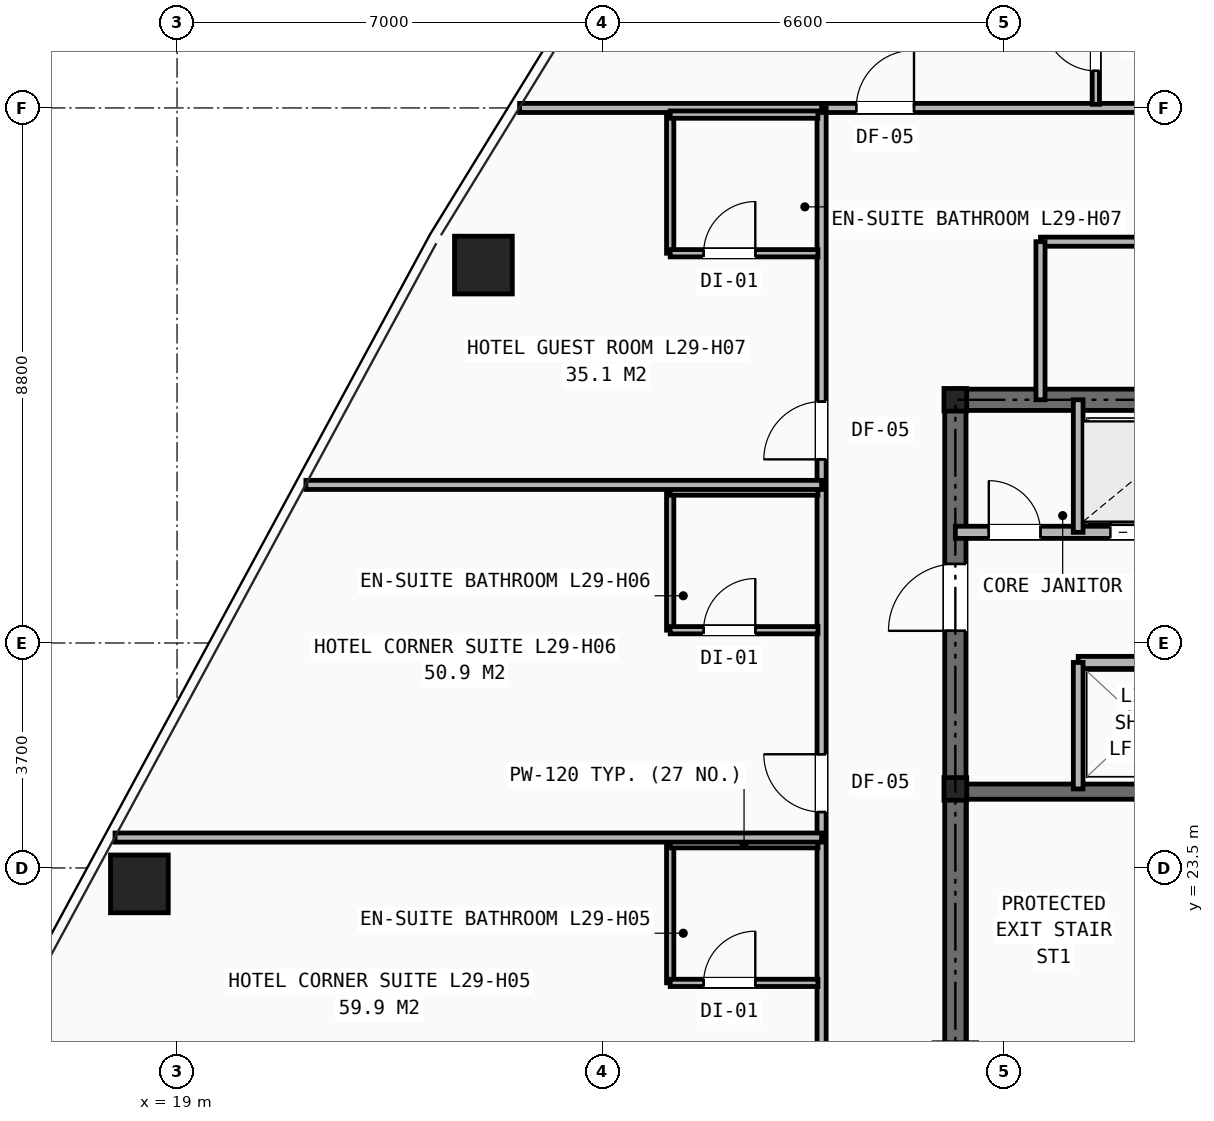
"""IFC4 building model, lengths in metres.
Left out: names, types, materials, properties, quantities, classifications, styles, units other than length and angle.
Written with IfcOpenShell. Run it as: python <this file> out.ifc"""

import sys

from ifc_helpers import new_model, si_unit, direction, frame, frame_2d, origin, origin_2d, place, context, subcontext, project, spatial, rectangle, hollow_rectangle, i_section, extrude, element, fill, save


model = new_model("IFC4")
c1 = context("Model", 3, precision=1e-05, world=origin(), true_north=direction((0.0, 1.0)))
c2 = subcontext(c1, "Body", "Model", "MODEL_VIEW")
j1 = project(units=[si_unit("LENGTHUNIT", "METRE"), si_unit("PLANEANGLEUNIT", "RADIAN")], contexts=[c1])
p1 = place(None, origin())
s1 = spatial("IfcSite", under=j1, at=p1, CompositionType="ELEMENT")
p2 = place(p1, origin())
s2 = spatial("IfcBuilding", under=s1, at=p2, CompositionType="ELEMENT")
p3 = place(p2, frame((0.0, 0.0, 102.2)))
s3 = spatial("IfcBuildingStorey", under=s2, at=p3, CompositionType="ELEMENT", Elevation=102.2)
for number, where, z_axis, x_axis in (
    (1, (31.8, 24.8, 0.0), (0.0, 0.0, 1.0), (1.0, 0.0, 0.0)),
    (2, (31.8, 31.2, 0.0), (0.0, 0.0, 1.0), (1.0, 0.0, 0.0)),
):
    element("IfcColumn", number, at=place(p3, frame(where, z_axis=z_axis, x_axis=x_axis)), inside=s3, PredefinedType="COLUMN", context=c2, shape_type="SweptSolid", body=[
        extrude(i_section(OverallWidth=0.374, OverallDepth=0.372, WebThickness=0.016, FlangeThickness=0.026, at=origin_2d()), origin(), (0.0, 0.0, 1.0), 3.2),
    ])
for number, where, z_axis, x_axis in (
    (3, (24.038, 33.416, 0.0), (0.0, 0.0, 1.0), (1.0, 0.0, 0.0)),
    (4, (18.381, 23.238, 0.0), (0.0, 0.0, 1.0), (1.0, 0.0, 0.0)),
):
    element("IfcColumn", number, at=place(p3, frame(where, z_axis=z_axis, x_axis=x_axis)), inside=s3, PredefinedType="COLUMN", context=c2, shape_type="SweptSolid", body=[
        extrude(hollow_rectangle(XDim=0.95, YDim=0.95, WallThickness=0.065, at=origin_2d()), origin(), (0.0, 0.0, 1.0), 3.2),
    ])
p4 = place(p3, frame((31.8, 31.2, 0.0), z_axis=(0.0, 0.0, 1.0), x_axis=(1.0, 0.0, 0.0)))
e5 = element("IfcWall", 5, at=p4, inside=s3, PredefinedType="SHEAR", context=c2, shape_type="SweptSolid", body=[
    extrude(rectangle(XDim=16.4, YDim=0.35, at=frame_2d((8.2, 0.0))), origin(), (0.0, 0.0, 1.0), 2.97),
])
p5 = place(p3, frame((31.8, 16.4, 0.0), z_axis=(0.0, 0.0, 1.0), x_axis=(0.0, 1.0, 0.0)))
e6 = element("IfcWall", 6, at=p5, inside=s3, PredefinedType="SHEAR", context=c2, shape_type="SweptSolid", body=[
    extrude(rectangle(XDim=14.8, YDim=0.35, at=frame_2d((7.4, 0.0))), origin(), (0.0, 0.0, 1.0), 2.97),
])
p6 = place(p5, frame((11.0, 0.0, 0.0)))
e7 = element("IfcOpeningElement", 7, at=p6, cuts=e6, PredefinedType="OPENING", context=c2, shape_type="SweptSolid", body=[
    extrude(rectangle(XDim=1.1, YDim=2.15, at=frame_2d((0.55, 1.075))), frame((0.0, 0.185, 0.0), z_axis=(0.0, -1.0, 0.0), x_axis=(1.0, 0.0, 0.0)), (0.0, 0.0, 1.0), 0.37),
])
p7 = place(p3, frame((31.8, 24.755, 0.0), z_axis=(0.0, 0.0, 1.0), x_axis=(1.0, 0.0, 0.0)))
e8 = element("IfcWall", 8, at=p7, inside=s3, PredefinedType="SHEAR", context=c2, shape_type="SweptSolid", body=[
    extrude(rectangle(XDim=3.245, YDim=0.25, at=frame_2d((1.623, 0.0))), origin(), (0.0, 0.0, 1.0), 2.97),
])
p8 = place(p3, frame((31.8, 29.02, 0.0), z_axis=(0.0, 0.0, 1.0), x_axis=(1.0, 0.0, 0.0)))
e9 = element("IfcWall", 9, at=p8, inside=s3, PredefinedType="SOLIDWALL", context=c2, shape_type="SweptSolid", body=[
    extrude(rectangle(XDim=16.4, YDim=0.2, at=frame_2d((8.2, 0.0))), origin(), (0.0, 0.0, 1.0), 2.421),
])
p9 = place(p8, frame((0.55, 0.0, 0.0)))
e10 = element("IfcOpeningElement", 10, at=p9, cuts=e9, PredefinedType="OPENING", context=c2, shape_type="SweptSolid", body=[
    extrude(rectangle(XDim=0.85, YDim=2.05, at=frame_2d((0.425, 1.025))), frame((0.0, 0.11, 0.0), z_axis=(0.0, -1.0, 0.0), x_axis=(1.0, 0.0, 0.0)), (0.0, 0.0, 1.0), 0.22),
])
p10 = place(p8, frame((2.55, 0.0, 0.0)))
e11 = element("IfcOpeningElement", 11, at=p10, cuts=e9, PredefinedType="OPENING", context=c2, shape_type="SweptSolid", body=[
    extrude(rectangle(XDim=1.1, YDim=2.15, at=frame_2d((0.55, 1.075))), frame((0.0, 0.11, 0.0), z_axis=(0.0, -1.0, 0.0), x_axis=(1.0, 0.0, 0.0)), (0.0, 0.0, 1.0), 0.22),
])
p11 = place(p8, frame((4.71, 0.0, 0.0)))
e12 = element("IfcOpeningElement", 12, at=p11, cuts=e9, PredefinedType="OPENING", context=c2, shape_type="SweptSolid", body=[
    extrude(rectangle(XDim=1.1, YDim=2.15, at=frame_2d((0.55, 1.075))), frame((0.0, 0.11, 0.0), z_axis=(0.0, -1.0, 0.0), x_axis=(1.0, 0.0, 0.0)), (0.0, 0.0, 1.0), 0.22),
])
p12 = place(p8, frame((6.87, 0.0, 0.0)))
e13 = element("IfcOpeningElement", 13, at=p12, cuts=e9, PredefinedType="OPENING", context=c2, shape_type="SweptSolid", body=[
    extrude(rectangle(XDim=1.1, YDim=2.15, at=frame_2d((0.55, 1.075))), frame((0.0, 0.11, 0.0), z_axis=(0.0, -1.0, 0.0), x_axis=(1.0, 0.0, 0.0)), (0.0, 0.0, 1.0), 0.22),
])
p13 = place(p8, frame((9.03, 0.0, 0.0)))
e14 = element("IfcOpeningElement", 14, at=p13, cuts=e9, PredefinedType="OPENING", context=c2, shape_type="SweptSolid", body=[
    extrude(rectangle(XDim=1.1, YDim=2.15, at=frame_2d((0.55, 1.075))), frame((0.0, 0.11, 0.0), z_axis=(0.0, -1.0, 0.0), x_axis=(1.0, 0.0, 0.0)), (0.0, 0.0, 1.0), 0.22),
])
p14 = place(p3, frame((33.82, 26.88, 0.0), z_axis=(0.0, 0.0, 1.0), x_axis=(1.0, 0.0, 0.0)))
e15 = element("IfcWall", 15, at=p14, inside=s3, PredefinedType="SOLIDWALL", context=c2, shape_type="SweptSolid", body=[
    extrude(rectangle(XDim=14.38, YDim=0.2, at=frame_2d((7.19, 0.0))), origin(), (0.0, 0.0, 1.0), 2.421),
])
p15 = place(p3, frame((33.82, 29.02, 0.0), z_axis=(0.0, 0.0, 1.0), x_axis=(0.0, 1.0, 0.0)))
e16 = element("IfcWall", 16, at=p15, inside=s3, PredefinedType="SOLIDWALL", context=c2, shape_type="SweptSolid", body=[
    extrude(rectangle(XDim=2.18, YDim=0.16, at=frame_2d((1.09, 0.0))), origin(), (0.0, 0.0, 1.0), 2.421),
])
p16 = place(p3, frame((33.82, 24.8, 0.0), z_axis=(0.0, 0.0, 1.0), x_axis=(0.0, 1.0, 0.0)))
e17 = element("IfcWall", 17, at=p16, inside=s3, PredefinedType="SOLIDWALL", context=c2, shape_type="SweptSolid", body=[
    extrude(rectangle(XDim=2.08, YDim=0.16, at=frame_2d((1.04, 0.0))), origin(), (0.0, 0.0, 1.0), 2.97),
])
p17 = place(p3, frame((33.2, 33.8, 0.0), z_axis=(0.0, 0.0, 1.0), x_axis=(1.0, 0.0, 0.0)))
e18 = element("IfcWall", 18, at=p17, inside=s3, PredefinedType="PARTITIONING", context=c2, shape_type="SweptSolid", body=[
    extrude(rectangle(XDim=13.0, YDim=0.15, at=frame_2d((6.5, 0.0))), origin(), (0.0, 0.0, 1.0), 2.97),
])
p18 = place(p17, frame((1.7, 0.0, 0.0)))
e19 = element("IfcOpeningElement", 19, at=p18, cuts=e18, PredefinedType="OPENING", context=c2, shape_type="SweptSolid", body=[
    extrude(rectangle(XDim=0.9, YDim=2.1, at=frame_2d((0.45, 1.05))), frame((0.0, 0.085, 0.0), z_axis=(0.0, -1.0, 0.0), x_axis=(1.0, 0.0, 0.0)), (0.0, 0.0, 1.0), 0.17),
])
p19 = place(p17, frame((6.0, 0.0, 0.0)))
e20 = element("IfcOpeningElement", 20, at=p19, cuts=e18, PredefinedType="OPENING", context=c2, shape_type="SweptSolid", body=[
    extrude(rectangle(XDim=0.9, YDim=2.1, at=frame_2d((0.45, 1.05))), frame((0.0, 0.085, 0.0), z_axis=(0.0, -1.0, 0.0), x_axis=(1.0, 0.0, 0.0)), (0.0, 0.0, 1.0), 0.17),
])
p20 = place(p17, frame((10.35, 0.0, 0.0)))
e21 = element("IfcOpeningElement", 21, at=p20, cuts=e18, PredefinedType="OPENING", context=c2, shape_type="SweptSolid", body=[
    extrude(rectangle(XDim=0.9, YDim=2.1, at=frame_2d((0.45, 1.05))), frame((0.0, 0.085, 0.0), z_axis=(0.0, -1.0, 0.0), x_axis=(1.0, 0.0, 0.0)), (0.0, 0.0, 1.0), 0.17),
])
p21 = place(p3, frame((33.2, 31.2, 0.0), z_axis=(0.0, 0.0, 1.0), x_axis=(0.0, 1.0, 0.0)))
e22 = element("IfcWall", 22, at=p21, inside=s3, PredefinedType="PARTITIONING", context=c2, shape_type="SweptSolid", body=[
    extrude(rectangle(XDim=2.6, YDim=0.15, at=frame_2d((1.3, 0.0))), origin(), (0.0, 0.0, 1.0), 2.421),
])
p22 = place(p3, frame((29.6, 36.0, 0.0), z_axis=(0.0, 0.0, 1.0), x_axis=(1.0, 0.0, 0.0)))
e23 = element("IfcWall", 23, at=p22, inside=s3, PredefinedType="PARTITIONING", context=c2, shape_type="SweptSolid", body=[
    extrude(rectangle(XDim=9.65, YDim=0.15, at=frame_2d((4.825, 0.0))), origin(), (0.0, 0.0, 1.0), 2.503),
])
p23 = place(p22, frame((0.57, 0.0, 0.0)))
e24 = element("IfcOpeningElement", 24, at=p23, cuts=e23, PredefinedType="OPENING", context=c2, shape_type="SweptSolid", body=[
    extrude(rectangle(XDim=0.95, YDim=2.1, at=frame_2d((0.475, 1.05))), frame((0.0, 0.085, 0.0), z_axis=(0.0, -1.0, 0.0), x_axis=(1.0, 0.0, 0.0)), (0.0, 0.0, 1.0), 0.17),
])
p24 = place(p22, frame((7.32, 0.0, 0.0)))
e25 = element("IfcOpeningElement", 25, at=p24, cuts=e23, PredefinedType="OPENING", context=c2, shape_type="SweptSolid", body=[
    extrude(rectangle(XDim=0.95, YDim=2.1, at=frame_2d((0.475, 1.05))), frame((0.0, 0.085, 0.0), z_axis=(0.0, -1.0, 0.0), x_axis=(1.0, 0.0, 0.0)), (0.0, 0.0, 1.0), 0.17),
])
p25 = place(p3, frame((29.6, 14.1, 0.0), z_axis=(0.0, 0.0, 1.0), x_axis=(0.0, 1.0, 0.0)))
e26 = element("IfcWall", 26, at=p25, inside=s3, PredefinedType="PARTITIONING", context=c2, shape_type="SweptSolid", body=[
    extrude(rectangle(XDim=21.9, YDim=0.15, at=frame_2d((10.95, 0.0))), origin(), (0.0, 0.0, 1.0), 2.421),
])
p26 = place(p25, frame((0.42, 0.0, 0.0)))
e27 = element("IfcOpeningElement", 27, at=p26, cuts=e26, PredefinedType="OPENING", context=c2, shape_type="SweptSolid", body=[
    extrude(rectangle(XDim=0.95, YDim=2.1, at=frame_2d((0.475, 1.05))), frame((0.0, 0.085, 0.0), z_axis=(0.0, -1.0, 0.0), x_axis=(1.0, 0.0, 0.0)), (0.0, 0.0, 1.0), 0.17),
])
p27 = place(p25, frame((5.12, 0.0, 0.0)))
e28 = element("IfcOpeningElement", 28, at=p27, cuts=e26, PredefinedType="OPENING", context=c2, shape_type="SweptSolid", body=[
    extrude(rectangle(XDim=0.95, YDim=2.1, at=frame_2d((0.475, 1.05))), frame((0.0, 0.085, 0.0), z_axis=(0.0, -1.0, 0.0), x_axis=(1.0, 0.0, 0.0)), (0.0, 0.0, 1.0), 0.17),
])
p28 = place(p25, frame((10.32, 0.0, 0.0)))
e29 = element("IfcOpeningElement", 29, at=p28, cuts=e26, PredefinedType="OPENING", context=c2, shape_type="SweptSolid", body=[
    extrude(rectangle(XDim=0.95, YDim=2.1, at=frame_2d((0.475, 1.05))), frame((0.0, 0.085, 0.0), z_axis=(0.0, -1.0, 0.0), x_axis=(1.0, 0.0, 0.0)), (0.0, 0.0, 1.0), 0.17),
])
p29 = place(p25, frame((16.12, 0.0, 0.0)))
e30 = element("IfcOpeningElement", 30, at=p29, cuts=e26, PredefinedType="OPENING", context=c2, shape_type="SweptSolid", body=[
    extrude(rectangle(XDim=0.95, YDim=2.1, at=frame_2d((0.475, 1.05))), frame((0.0, 0.085, 0.0), z_axis=(0.0, -1.0, 0.0), x_axis=(1.0, 0.0, 0.0)), (0.0, 0.0, 1.0), 0.17),
])
p30 = place(p3, frame((24.633, 36.0, 0.0), z_axis=(0.0, 0.0, 1.0), x_axis=(1.0, 0.0, 0.0)))
e31 = element("IfcWall", 31, at=p30, inside=s3, PredefinedType="PARTITIONING", context=c2, shape_type="SweptSolid", body=[
    extrude(rectangle(XDim=4.967, YDim=0.15, at=frame_2d((2.483, 0.0))), origin(), (0.0, 0.0, 1.0), 2.258),
])
p31 = place(p3, frame((27.11, 21.61, 0.0), z_axis=(0.0, 0.0, 1.0), x_axis=(0.0, 1.0, 0.0)))
e32 = element("IfcWall", 32, at=p31, inside=s3, PredefinedType="PARTITIONING", context=c2, shape_type="SweptSolid", body=[
    extrude(rectangle(XDim=2.28, YDim=0.12, at=frame_2d((1.14, 0.0))), origin(), (0.0, 0.0, 1.0), 2.97),
])
p32 = place(p3, frame((27.11, 21.61, 0.0), z_axis=(0.0, 0.0, 1.0), x_axis=(1.0, 0.0, 0.0)))
e33 = element("IfcWall", 33, at=p32, inside=s3, PredefinedType="PARTITIONING", context=c2, shape_type="SweptSolid", body=[
    extrude(rectangle(XDim=2.43, YDim=0.12, at=frame_2d((1.215, 0.0))), origin(), (0.0, 0.0, 1.0), 2.97),
])
p33 = place(p32, frame((0.55, 0.0, 0.0)))
e34 = element("IfcOpeningElement", 34, at=p33, cuts=e33, PredefinedType="OPENING", context=c2, shape_type="SweptSolid", body=[
    extrude(rectangle(XDim=0.85, YDim=2.05, at=frame_2d((0.425, 1.025))), frame((0.0, 0.07, 0.0), z_axis=(0.0, -1.0, 0.0), x_axis=(1.0, 0.0, 0.0)), (0.0, 0.0, 1.0), 0.14),
])
p34 = place(p3, frame((27.11, 23.89, 0.0), z_axis=(0.0, 0.0, 1.0), x_axis=(1.0, 0.0, 0.0)))
e35 = element("IfcWall", 35, at=p34, inside=s3, PredefinedType="PARTITIONING", context=c2, shape_type="SweptSolid", body=[
    extrude(rectangle(XDim=2.43, YDim=0.12, at=frame_2d((1.215, 0.0))), origin(), (0.0, 0.0, 1.0), 2.97),
])
p35 = place(p3, frame((17.98, 24.0, 0.0), z_axis=(0.0, 0.0, 1.0), x_axis=(1.0, 0.0, 0.0)))
e36 = element("IfcWall", 36, at=p35, inside=s3, PredefinedType="PARTITIONING", context=c2, shape_type="SweptSolid", body=[
    extrude(rectangle(XDim=11.62, YDim=0.15, at=frame_2d((5.81, 0.0))), origin(), (0.0, 0.0, 1.0), 2.258),
])
p36 = place(p3, frame((27.11, 27.41, 0.0), z_axis=(0.0, 0.0, 1.0), x_axis=(0.0, 1.0, 0.0)))
e37 = element("IfcWall", 37, at=p36, inside=s3, PredefinedType="PARTITIONING", context=c2, shape_type="SweptSolid", body=[
    extrude(rectangle(XDim=2.28, YDim=0.12, at=frame_2d((1.14, 0.0))), origin(), (0.0, 0.0, 1.0), 2.97),
])
p37 = place(p3, frame((27.11, 27.41, 0.0), z_axis=(0.0, 0.0, 1.0), x_axis=(1.0, 0.0, 0.0)))
e38 = element("IfcWall", 38, at=p37, inside=s3, PredefinedType="PARTITIONING", context=c2, shape_type="SweptSolid", body=[
    extrude(rectangle(XDim=2.43, YDim=0.12, at=frame_2d((1.215, 0.0))), origin(), (0.0, 0.0, 1.0), 2.97),
])
p38 = place(p37, frame((0.55, 0.0, 0.0)))
e39 = element("IfcOpeningElement", 39, at=p38, cuts=e38, PredefinedType="OPENING", context=c2, shape_type="SweptSolid", body=[
    extrude(rectangle(XDim=0.85, YDim=2.05, at=frame_2d((0.425, 1.025))), frame((0.0, 0.07, 0.0), z_axis=(0.0, -1.0, 0.0), x_axis=(1.0, 0.0, 0.0)), (0.0, 0.0, 1.0), 0.14),
])
p39 = place(p3, frame((27.11, 29.69, 0.0), z_axis=(0.0, 0.0, 1.0), x_axis=(1.0, 0.0, 0.0)))
e40 = element("IfcWall", 40, at=p39, inside=s3, PredefinedType="PARTITIONING", context=c2, shape_type="SweptSolid", body=[
    extrude(rectangle(XDim=2.43, YDim=0.12, at=frame_2d((1.215, 0.0))), origin(), (0.0, 0.0, 1.0), 2.97),
])
p40 = place(p3, frame((21.119, 29.8, 0.0), z_axis=(0.0, 0.0, 1.0), x_axis=(1.0, 0.0, 0.0)))
e41 = element("IfcWall", 41, at=p40, inside=s3, PredefinedType="PARTITIONING", context=c2, shape_type="SweptSolid", body=[
    extrude(rectangle(XDim=8.481, YDim=0.15, at=frame_2d((4.241, 0.0))), origin(), (0.0, 0.0, 1.0), 2.258),
])
p41 = place(p3, frame((27.11, 33.61, 0.0), z_axis=(0.0, 0.0, 1.0), x_axis=(0.0, 1.0, 0.0)))
e42 = element("IfcWall", 42, at=p41, inside=s3, PredefinedType="PARTITIONING", context=c2, shape_type="SweptSolid", body=[
    extrude(rectangle(XDim=2.28, YDim=0.12, at=frame_2d((1.14, 0.0))), origin(), (0.0, 0.0, 1.0), 2.97),
])
p42 = place(p3, frame((27.11, 33.61, 0.0), z_axis=(0.0, 0.0, 1.0), x_axis=(1.0, 0.0, 0.0)))
e43 = element("IfcWall", 43, at=p42, inside=s3, PredefinedType="PARTITIONING", context=c2, shape_type="SweptSolid", body=[
    extrude(rectangle(XDim=2.43, YDim=0.12, at=frame_2d((1.215, 0.0))), origin(), (0.0, 0.0, 1.0), 2.503),
])
p43 = place(p42, frame((0.55, 0.0, 0.0)))
e44 = element("IfcOpeningElement", 44, at=p43, cuts=e43, PredefinedType="OPENING", context=c2, shape_type="SweptSolid", body=[
    extrude(rectangle(XDim=0.85, YDim=2.05, at=frame_2d((0.425, 1.025))), frame((0.0, 0.07, 0.0), z_axis=(0.0, -1.0, 0.0), x_axis=(1.0, 0.0, 0.0)), (0.0, 0.0, 1.0), 0.14),
])
p44 = place(p3, frame((27.11, 35.89, 0.0), z_axis=(0.0, 0.0, 1.0), x_axis=(1.0, 0.0, 0.0)))
e45 = element("IfcWall", 45, at=p44, inside=s3, PredefinedType="PARTITIONING", context=c2, shape_type="SweptSolid", body=[
    extrude(rectangle(XDim=2.43, YDim=0.12, at=frame_2d((1.215, 0.0))), origin(), (0.0, 0.0, 1.0), 2.503),
])
p45 = place(p3, frame((34.11, 36.06, 0.0), z_axis=(0.0, 0.0, 1.0), x_axis=(0.0, 1.0, 0.0)))
e46 = element("IfcWall", 46, at=p45, inside=s3, PredefinedType="PARTITIONING", context=c2, shape_type="SweptSolid", body=[
    extrude(rectangle(XDim=2.43, YDim=0.12, at=frame_2d((1.215, 0.0))), origin(), (0.0, 0.0, 1.0), 2.97),
])
p46 = place(p45, frame((0.55, 0.0, 0.0)))
e47 = element("IfcOpeningElement", 47, at=p46, cuts=e46, PredefinedType="OPENING", context=c2, shape_type="SweptSolid", body=[
    extrude(rectangle(XDim=0.85, YDim=2.05, at=frame_2d((0.425, 1.025))), frame((0.0, 0.07, 0.0), z_axis=(0.0, -1.0, 0.0), x_axis=(1.0, 0.0, 0.0)), (0.0, 0.0, 1.0), 0.14),
])
p47 = place(p9, origin())
e48 = element("IfcDoor", 48, at=p47, inside=s3, OperationType="SINGLE_SWING_LEFT", PredefinedType="DOOR", context=c2, shape_type="SweptSolid", body=[
    extrude(rectangle(XDim=0.85, YDim=2.05, at=frame_2d((0.425, 1.025))), frame((0.0, 0.025, 0.0), z_axis=(0.0, -1.0, 0.0), x_axis=(1.0, 0.0, 0.0)), (0.0, 0.0, 1.0), 0.05),
])
fill(e10, e48)
p48 = place(p6, origin())
e49 = element("IfcDoor", 49, at=p48, inside=s3, OperationType="SINGLE_SWING_LEFT", PredefinedType="DOOR", context=c2, shape_type="SweptSolid", body=[
    extrude(rectangle(XDim=1.1, YDim=2.15, at=frame_2d((0.55, 1.075))), frame((0.0, 0.025, 0.0), z_axis=(0.0, -1.0, 0.0), x_axis=(1.0, 0.0, 0.0)), (0.0, 0.0, 1.0), 0.05),
])
fill(e7, e49)
p49 = place(p10, origin())
e50 = element("IfcDoor", 50, at=p49, inside=s3, OperationType="DOUBLE_DOOR_SLIDING", PredefinedType="DOOR", context=c2, shape_type="SweptSolid", body=[
    extrude(rectangle(XDim=1.1, YDim=2.15, at=frame_2d((0.55, 1.075))), frame((0.0, 0.025, 0.0), z_axis=(0.0, -1.0, 0.0), x_axis=(1.0, 0.0, 0.0)), (0.0, 0.0, 1.0), 0.05),
])
fill(e11, e50)
p50 = place(p33, origin())
e51 = element("IfcDoor", 51, at=p50, inside=s3, OperationType="SINGLE_SWING_RIGHT", PredefinedType="DOOR", context=c2, shape_type="SweptSolid", body=[
    extrude(rectangle(XDim=0.85, YDim=2.05, at=frame_2d((0.425, 1.025))), frame((0.0, 0.025, 0.0), z_axis=(0.0, -1.0, 0.0), x_axis=(1.0, 0.0, 0.0)), (0.0, 0.0, 1.0), 0.05),
])
fill(e34, e51)
p51 = place(p28, origin())
e52 = element("IfcDoor", 52, at=p51, inside=s3, OperationType="SINGLE_SWING_RIGHT", PredefinedType="DOOR", context=c2, shape_type="SweptSolid", body=[
    extrude(rectangle(XDim=0.95, YDim=2.1, at=frame_2d((0.475, 1.05))), frame((0.0, 0.025, 0.0), z_axis=(0.0, -1.0, 0.0), x_axis=(1.0, 0.0, 0.0)), (0.0, 0.0, 1.0), 0.05),
])
fill(e29, e52)
p52 = place(p38, origin())
e53 = element("IfcDoor", 53, at=p52, inside=s3, OperationType="SINGLE_SWING_RIGHT", PredefinedType="DOOR", context=c2, shape_type="SweptSolid", body=[
    extrude(rectangle(XDim=0.85, YDim=2.05, at=frame_2d((0.425, 1.025))), frame((0.0, 0.025, 0.0), z_axis=(0.0, -1.0, 0.0), x_axis=(1.0, 0.0, 0.0)), (0.0, 0.0, 1.0), 0.05),
])
fill(e39, e53)
p53 = place(p29, origin())
e54 = element("IfcDoor", 54, at=p53, inside=s3, OperationType="SINGLE_SWING_LEFT", PredefinedType="DOOR", context=c2, shape_type="SweptSolid", body=[
    extrude(rectangle(XDim=0.95, YDim=2.1, at=frame_2d((0.475, 1.05))), frame((0.0, 0.025, 0.0), z_axis=(0.0, -1.0, 0.0), x_axis=(1.0, 0.0, 0.0)), (0.0, 0.0, 1.0), 0.05),
])
fill(e30, e54)
p54 = place(p43, origin())
e55 = element("IfcDoor", 55, at=p54, inside=s3, OperationType="SINGLE_SWING_RIGHT", PredefinedType="DOOR", context=c2, shape_type="SweptSolid", body=[
    extrude(rectangle(XDim=0.85, YDim=2.05, at=frame_2d((0.425, 1.025))), frame((0.0, 0.025, 0.0), z_axis=(0.0, -1.0, 0.0), x_axis=(1.0, 0.0, 0.0)), (0.0, 0.0, 1.0), 0.05),
])
fill(e44, e55)
p55 = place(p23, origin())
e56 = element("IfcDoor", 56, at=p55, inside=s3, OperationType="SINGLE_SWING_RIGHT", PredefinedType="DOOR", context=c2, shape_type="SweptSolid", body=[
    extrude(rectangle(XDim=0.95, YDim=2.1, at=frame_2d((0.475, 1.05))), frame((0.0, 0.025, 0.0), z_axis=(0.0, -1.0, 0.0), x_axis=(1.0, 0.0, 0.0)), (0.0, 0.0, 1.0), 0.05),
])
fill(e24, e56)
p56 = place(p46, origin())
e57 = element("IfcDoor", 57, at=p56, inside=s3, OperationType="SINGLE_SWING_RIGHT", PredefinedType="DOOR", context=c2, shape_type="SweptSolid", body=[
    extrude(rectangle(XDim=0.85, YDim=2.05, at=frame_2d((0.425, 1.025))), frame((0.0, 0.025, 0.0), z_axis=(0.0, -1.0, 0.0), x_axis=(1.0, 0.0, 0.0)), (0.0, 0.0, 1.0), 0.05),
])
fill(e47, e57)
save(model, sys.argv[1])
